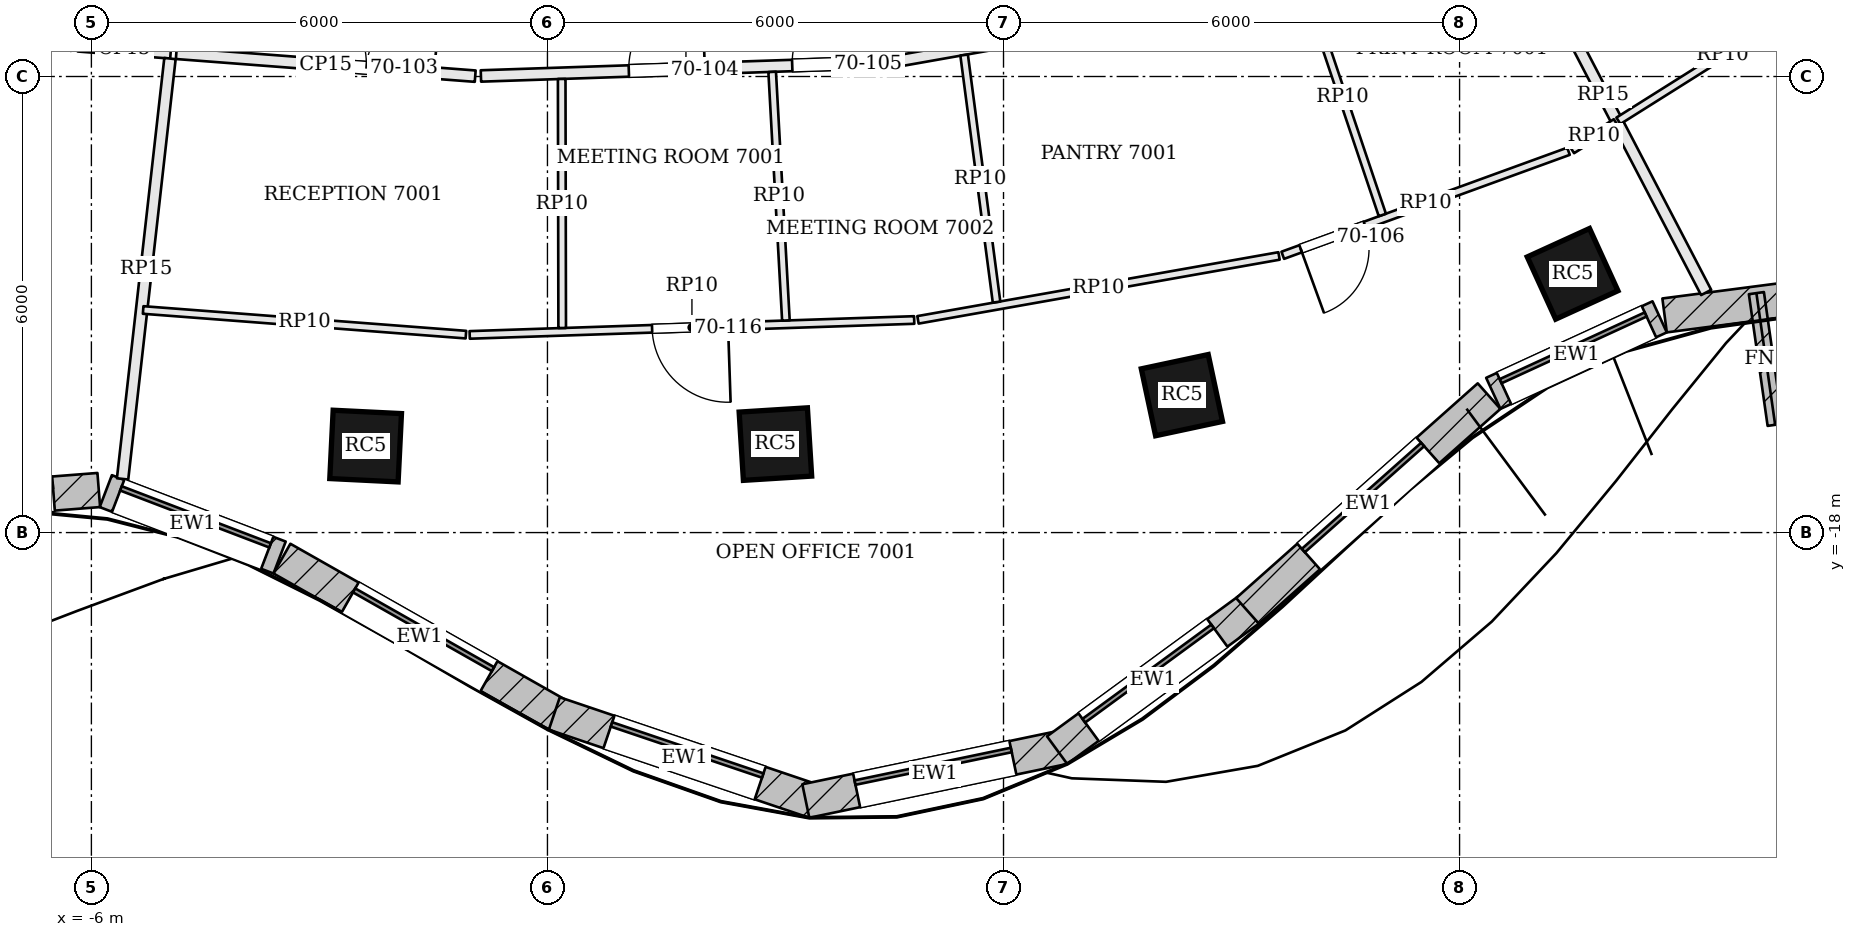
"""IFC4 building model, lengths in metres.
Left out: names, types, materials, properties, quantities, classifications, styles, units other than length and angle.
Written with IfcOpenShell. Run it as: python <this file> out.ifc"""

import sys

from ifc_helpers import new_model, si_unit, direction, frame, frame_2d, origin, origin_2d, place, context, subcontext, project, spatial, rectangle, extrude, element, fill, save


model = new_model("IFC4")
c1 = context("Model", 3, precision=1e-05, world=origin(), true_north=direction((0.0, 1.0)))
c2 = subcontext(c1, "Body", "Model", "MODEL_VIEW")
j1 = project(units=[si_unit("LENGTHUNIT", "METRE"), si_unit("PLANEANGLEUNIT", "RADIAN")], contexts=[c1])
p1 = place(None, origin())
s1 = spatial("IfcSite", under=j1, at=p1, CompositionType="ELEMENT")
p2 = place(p1, origin())
s2 = spatial("IfcBuilding", under=s1, at=p2, CompositionType="ELEMENT")
p3 = place(p2, frame((0.0, 0.0, 284.4)))
s3 = spatial("IfcBuildingStorey", under=s2, at=p3, CompositionType="ELEMENT", Elevation=284.4)
for number, where, z_axis, x_axis in (
    (1, (-2.392, -16.862, 0.0), (0.0, 0.0, 1.0), (0.999, -0.049, 0.0)),
    (2, (2.999, -16.836, 0.0), (0.0, 0.0, 1.0), (0.998, 0.062, 0.0)),
    (3, (8.347, -16.192, 0.0), (0.0, 0.0, 1.0), (0.978, 0.209, 0.0)),
    (4, (13.487, -14.596, 0.0), (0.0, 0.0, 1.0), (0.91, 0.415, 0.0)),
):
    element("IfcColumn", number, at=place(p3, frame(where, z_axis=z_axis, x_axis=x_axis)), inside=s3, PredefinedType="COLUMN", context=c2, shape_type="SweptSolid", body=[
        extrude(rectangle(XDim=0.9, YDim=0.9, at=origin_2d()), origin(), (0.0, 0.0, 1.0), 3.9),
    ])
p4 = place(p3, frame((-9.188, -17.697, 0.0), z_axis=(0.0, 0.0, 1.0), x_axis=(0.996964028691, 0.077863505548, 0.0)))
e5 = element("IfcWall", 5, at=p4, inside=s3, PredefinedType="SOLIDWALL", context=c2, shape_type="SweptSolid", body=[
    extrude(rectangle(XDim=3.295, YDim=0.45, at=frame_2d((1.648, 0.0))), origin(), (0.0, 0.0, 1.0), 3.7),
])
p5 = place(p4, frame((0.598, 0.0, 0.9)))
e6 = element("IfcOpeningElement", 6, at=p5, cuts=e5, PredefinedType="OPENING", context=c2, shape_type="SweptSolid", body=[
    extrude(rectangle(XDim=2.1, YDim=2.3, at=frame_2d((1.05, 1.15))), frame((0.0, 0.235, 0.0), z_axis=(0.0, -1.0, 0.0), x_axis=(1.0, 0.0, 0.0)), (0.0, 0.0, 1.0), 0.47),
])
p6 = place(p3, frame((-5.811, -17.455, 0.0), z_axis=(0.0, 0.0, 1.0), x_axis=(0.934122271306, -0.35695319336, 0.0)))
e7 = element("IfcWall", 7, at=p6, inside=s3, PredefinedType="SOLIDWALL", context=c2, shape_type="SweptSolid", body=[
    extrude(rectangle(XDim=2.448, YDim=0.45, at=frame_2d((1.224, 0.0))), origin(), (0.0, 0.0, 1.0), 3.7),
])
p7 = place(p6, frame((0.174, 0.0, 0.9)))
e8 = element("IfcOpeningElement", 8, at=p7, cuts=e7, PredefinedType="OPENING", context=c2, shape_type="SweptSolid", body=[
    extrude(rectangle(XDim=2.1, YDim=2.3, at=frame_2d((1.05, 1.15))), frame((0.0, 0.235, 0.0), z_axis=(0.0, -1.0, 0.0), x_axis=(1.0, 0.0, 0.0)), (0.0, 0.0, 1.0), 0.47),
])
p8 = place(p3, frame((-3.493, -18.343, 0.0), z_axis=(0.0, 0.0, 1.0), x_axis=(0.869825988853, -0.493358641473, 0.0)))
e9 = element("IfcWall", 9, at=p8, inside=s3, PredefinedType="SOLIDWALL", context=c2, shape_type="SweptSolid", body=[
    extrude(rectangle(XDim=4.165, YDim=0.45, at=frame_2d((2.083, 0.0))), origin(), (0.0, 0.0, 1.0), 3.7),
])
p9 = place(p8, frame((1.032, 0.0, 0.9)))
e10 = element("IfcOpeningElement", 10, at=p9, cuts=e9, PredefinedType="OPENING", context=c2, shape_type="SweptSolid", body=[
    extrude(rectangle(XDim=2.1, YDim=2.3, at=frame_2d((1.05, 1.15))), frame((0.0, 0.235, 0.0), z_axis=(0.0, -1.0, 0.0), x_axis=(1.0, 0.0, 0.0)), (0.0, 0.0, 1.0), 0.47),
])
p10 = place(p3, frame((0.091, -20.38, 0.0), z_axis=(0.0, 0.0, 1.0), x_axis=(0.947304227221, -0.320335294791, 0.0)))
e11 = element("IfcWall", 11, at=p10, inside=s3, PredefinedType="SOLIDWALL", context=c2, shape_type="SweptSolid", body=[
    extrude(rectangle(XDim=3.617, YDim=0.45, at=frame_2d((1.809, 0.0))), origin(), (0.0, 0.0, 1.0), 3.7),
])
p11 = place(p10, frame((0.759, 0.0, 0.9)))
e12 = element("IfcOpeningElement", 12, at=p11, cuts=e11, PredefinedType="OPENING", context=c2, shape_type="SweptSolid", body=[
    extrude(rectangle(XDim=2.1, YDim=2.3, at=frame_2d((1.05, 1.15))), frame((0.0, 0.235, 0.0), z_axis=(0.0, -1.0, 0.0), x_axis=(1.0, 0.0, 0.0)), (0.0, 0.0, 1.0), 0.47),
])
p12 = place(p3, frame((3.399, -21.532, 0.0), z_axis=(0.0, 0.0, 1.0), x_axis=(0.978915912181, 0.204263645512, 0.0)))
e13 = element("IfcWall", 13, at=p12, inside=s3, PredefinedType="SOLIDWALL", context=c2, shape_type="SweptSolid", body=[
    extrude(rectangle(XDim=3.466, YDim=0.45, at=frame_2d((1.733, 0.0))), origin(), (0.0, 0.0, 1.0), 3.7),
])
p13 = place(p12, frame((0.683, 0.0, 0.9)))
e14 = element("IfcOpeningElement", 14, at=p13, cuts=e13, PredefinedType="OPENING", context=c2, shape_type="SweptSolid", body=[
    extrude(rectangle(XDim=2.1, YDim=2.3, at=frame_2d((1.05, 1.15))), frame((0.0, 0.235, 0.0), z_axis=(0.0, -1.0, 0.0), x_axis=(1.0, 0.0, 0.0)), (0.0, 0.0, 1.0), 0.47),
])
p14 = place(p3, frame((6.705, -20.862, 0.0), z_axis=(0.0, 0.0, 1.0), x_axis=(0.806921336267, 0.590658917716, 0.0)))
e15 = element("IfcWall", 15, at=p14, inside=s3, PredefinedType="SOLIDWALL", context=c2, shape_type="SweptSolid", body=[
    extrude(rectangle(XDim=3.125, YDim=0.45, at=frame_2d((1.562, 0.0))), origin(), (0.0, 0.0, 1.0), 3.7),
])
p15 = place(p14, frame((0.512, 0.0, 0.9)))
e16 = element("IfcOpeningElement", 16, at=p15, cuts=e15, PredefinedType="OPENING", context=c2, shape_type="SweptSolid", body=[
    extrude(rectangle(XDim=2.1, YDim=2.3, at=frame_2d((1.05, 1.15))), frame((0.0, 0.235, 0.0), z_axis=(0.0, -1.0, 0.0), x_axis=(1.0, 0.0, 0.0)), (0.0, 0.0, 1.0), 0.47),
])
p16 = place(p3, frame((9.21, -19.03, 0.0), z_axis=(0.0, 0.0, 1.0), x_axis=(0.747396648191, 0.664378092861, 0.0)))
e17 = element("IfcWall", 17, at=p16, inside=s3, PredefinedType="SOLIDWALL", context=c2, shape_type="SweptSolid", body=[
    extrude(rectangle(XDim=4.252, YDim=0.45, at=frame_2d((2.126, 0.0))), origin(), (0.0, 0.0, 1.0), 3.7),
])
p17 = place(p16, frame((1.076, 0.0, 0.9)))
e18 = element("IfcOpeningElement", 18, at=p17, cuts=e17, PredefinedType="OPENING", context=c2, shape_type="SweptSolid", body=[
    extrude(rectangle(XDim=2.1, YDim=2.3, at=frame_2d((1.05, 1.15))), frame((0.0, 0.235, 0.0), z_axis=(0.0, -1.0, 0.0), x_axis=(1.0, 0.0, 0.0)), (0.0, 0.0, 1.0), 0.47),
])
p18 = place(p3, frame((12.444, -16.169, 0.0), z_axis=(0.0, 0.0, 1.0), x_axis=(0.908468904074, 0.417952449844, 0.0)))
e19 = element("IfcWall", 19, at=p18, inside=s3, PredefinedType="SOLIDWALL", context=c2, shape_type="SweptSolid", body=[
    extrude(rectangle(XDim=2.409, YDim=0.45, at=frame_2d((1.205, 0.0))), origin(), (0.0, 0.0, 1.0), 3.7),
])
p19 = place(p18, frame((0.155, 0.0, 0.9)))
e20 = element("IfcOpeningElement", 20, at=p19, cuts=e19, PredefinedType="OPENING", context=c2, shape_type="SweptSolid", body=[
    extrude(rectangle(XDim=2.1, YDim=2.3, at=frame_2d((1.05, 1.15))), frame((0.0, 0.235, 0.0), z_axis=(0.0, -1.0, 0.0), x_axis=(1.0, 0.0, 0.0)), (0.0, 0.0, 1.0), 0.47),
])
p20 = place(p3, frame((14.697, -15.143, 0.0), z_axis=(0.0, 0.0, 1.0), x_axis=(0.991631798411, 0.129098320597, 0.0)))
e21 = element("IfcWall", 21, at=p20, inside=s3, PredefinedType="SOLIDWALL", context=c2, shape_type="SweptSolid", body=[
    extrude(rectangle(XDim=5.547, YDim=0.45, at=frame_2d((2.773, 0.0))), origin(), (0.0, 0.0, 1.0), 3.7),
])
p21 = place(p20, frame((1.723, 0.0, 0.9)))
e22 = element("IfcOpeningElement", 22, at=p21, cuts=e21, PredefinedType="OPENING", context=c2, shape_type="SweptSolid", body=[
    extrude(rectangle(XDim=2.1, YDim=2.3, at=frame_2d((1.05, 1.15))), frame((0.0, 0.235, 0.0), z_axis=(0.0, -1.0, 0.0), x_axis=(1.0, 0.0, 0.0)), (0.0, 0.0, 1.0), 0.47),
])
p22 = place(p3, frame((15.905, -14.85, 0.0), z_axis=(0.0, 0.0, 1.0), x_axis=(0.140913490987, -0.990021912918, 0.0)))
e23 = element("IfcWall", 23, at=p22, inside=s3, PredefinedType="SOLIDWALL", context=c2, shape_type="SweptSolid", body=[
    extrude(rectangle(XDim=1.75, YDim=0.2, at=frame_2d((0.875, 0.0))), origin(), (0.0, 0.0, 1.0), 3.7),
])
p23 = place(p3, frame((-6.175, -11.596, 0.0), z_axis=(0.0, 0.0, 1.0), x_axis=(0.997106038867, -0.076023333621, 0.0)))
e24 = element("IfcWall", 24, at=p23, inside=s3, PredefinedType="PARTITIONING", context=c2, shape_type="SweptSolid", body=[
    extrude(rectangle(XDim=1.22, YDim=0.15, at=frame_2d((0.61, 0.0))), origin(), (0.0, 0.0, 1.0), 3.198),
])
p24 = place(p3, frame((-5.59, -17.294, 0.0), z_axis=(0.0, 0.0, 1.0), x_axis=(0.112044411854, 0.993703200041, 0.0)))
e25 = element("IfcWall", 25, at=p24, inside=s3, PredefinedType="PARTITIONING", context=c2, shape_type="SweptSolid", body=[
    extrude(rectangle(XDim=5.565, YDim=0.15, at=frame_2d((2.783, 0.0))), origin(), (0.0, 0.0, 1.0), 3.234),
])
p25 = place(p3, frame((-4.883, -11.695, 0.0), z_axis=(0.0, 0.0, 1.0), x_axis=(0.997096936577, -0.076142623207, 0.0)))
e26 = element("IfcWall", 26, at=p25, inside=s3, PredefinedType="PARTITIONING", context=c2, shape_type="SweptSolid", body=[
    extrude(rectangle(XDim=3.944, YDim=0.15, at=frame_2d((1.972, 0.0))), origin(), (0.0, 0.0, 1.0), 3.198),
])
p26 = place(p25, frame((1.604, 0.0, 0.0)))
e27 = element("IfcOpeningElement", 27, at=p26, cuts=e26, PredefinedType="OPENING", context=c2, shape_type="SweptSolid", body=[
    extrude(rectangle(XDim=1.8, YDim=2.1, at=frame_2d((0.9, 1.05))), frame((0.0, 0.085, 0.0), z_axis=(0.0, -1.0, 0.0), x_axis=(1.0, 0.0, 0.0)), (0.0, 0.0, 1.0), 0.17),
])
p27 = place(p3, frame((-0.875, -11.993, 0.0), z_axis=(0.0, 0.0, 1.0), x_axis=(0.999436745295, 0.033558786542, 0.0)))
e28 = element("IfcWall", 28, at=p27, inside=s3, PredefinedType="PARTITIONING", context=c2, shape_type="SweptSolid", body=[
    extrude(rectangle(XDim=5.398, YDim=0.15, at=frame_2d((2.699, 0.0))), origin(), (0.0, 0.0, 1.0), 3.198),
])
p28 = place(p27, frame((1.947, 0.0, 0.0)))
e29 = element("IfcOpeningElement", 29, at=p28, cuts=e28, PredefinedType="OPENING", context=c2, shape_type="SweptSolid", body=[
    extrude(rectangle(XDim=1.0, YDim=2.4, at=frame_2d((0.5, 1.2))), frame((0.0, 0.085, 0.0), z_axis=(0.0, -1.0, 0.0), x_axis=(1.0, 0.0, 0.0)), (0.0, 0.0, 1.0), 0.17),
])
p29 = place(p27, frame((4.098, 0.0, 0.0)))
e30 = element("IfcOpeningElement", 30, at=p29, cuts=e28, PredefinedType="OPENING", context=c2, shape_type="SweptSolid", body=[
    extrude(rectangle(XDim=1.0, YDim=2.4, at=frame_2d((0.5, 1.2))), frame((0.0, 0.085, 0.0), z_axis=(0.0, -1.0, 0.0), x_axis=(1.0, 0.0, 0.0)), (0.0, 0.0, 1.0), 0.17),
])
p30 = place(p3, frame((4.594, -11.799, 0.0), z_axis=(0.0, 0.0, 1.0), x_axis=(0.984693444773, 0.174295208833, 0.0)))
e31 = element("IfcWall", 31, at=p30, inside=s3, PredefinedType="PARTITIONING", context=c2, shape_type="SweptSolid", body=[
    extrude(rectangle(XDim=4.261, YDim=0.15, at=frame_2d((2.13, 0.0))), origin(), (0.0, 0.0, 1.0), 3.198),
])
p31 = place(p30, frame((2.05, 0.0, 0.0)))
e32 = element("IfcOpeningElement", 32, at=p31, cuts=e31, PredefinedType="OPENING", context=c2, shape_type="SweptSolid", body=[
    extrude(rectangle(XDim=1.0, YDim=2.1, at=frame_2d((0.5, 1.05))), frame((0.0, 0.085, 0.0), z_axis=(0.0, -1.0, 0.0), x_axis=(1.0, 0.0, 0.0)), (0.0, 0.0, 1.0), 0.17),
])
p32 = place(p3, frame((15.244, -14.841, 0.0), z_axis=(0.0, 0.0, 1.0), x_axis=(-0.462122511499, 0.886816093881, 0.0)))
e33 = element("IfcWall", 33, at=p32, inside=s3, PredefinedType="PARTITIONING", context=c2, shape_type="SweptSolid", body=[
    extrude(rectangle(XDim=5.871, YDim=0.15, at=frame_2d((2.935, 0.0))), origin(), (0.0, 0.0, 1.0), 3.234),
])
p33 = place(p3, frame((14.056, -12.604, 0.0), z_axis=(0.0, 0.0, 1.0), x_axis=(-0.846544184051, -0.532318461496, 0.0)))
e34 = element("IfcWall", 34, at=p33, inside=s3, PredefinedType="PARTITIONING", context=c2, shape_type="SweptSolid", body=[
    extrude(rectangle(XDim=0.681, YDim=0.1, at=frame_2d((0.34, 0.0))), origin(), (0.0, 0.0, 1.0), 3.198),
])
p34 = place(p3, frame((13.433, -12.984, 0.0), z_axis=(0.0, 0.0, 1.0), x_axis=(-0.939673979614, -0.342071355182, 0.0)))
e35 = element("IfcWall", 35, at=p34, inside=s3, PredefinedType="PARTITIONING", context=c2, shape_type="SweptSolid", body=[
    extrude(rectangle(XDim=4.0, YDim=0.1, at=frame_2d((2.0, 0.0))), origin(), (0.0, 0.0, 1.0), 3.198),
])
p35 = place(p34, frame((2.85, 0.0, 0.0)))
e36 = element("IfcOpeningElement", 36, at=p35, cuts=e35, PredefinedType="OPENING", context=c2, shape_type="SweptSolid", body=[
    extrude(rectangle(XDim=0.9, YDim=2.1, at=frame_2d((0.45, 1.05))), frame((0.0, 0.06, 0.0), z_axis=(0.0, -1.0, 0.0), x_axis=(1.0, 0.0, 0.0)), (0.0, 0.0, 1.0), 0.12),
])
p36 = place(p3, frame((9.625, -14.361, 0.0), z_axis=(0.0, 0.0, 1.0), x_axis=(-0.984691710098, -0.174305008716, 0.0)))
e37 = element("IfcWall", 37, at=p36, inside=s3, PredefinedType="PARTITIONING", context=c2, shape_type="SweptSolid", body=[
    extrude(rectangle(XDim=4.824, YDim=0.1, at=frame_2d((2.412, 0.0))), origin(), (0.0, 0.0, 1.0), 3.198),
])
p37 = place(p3, frame((4.825, -15.203, 0.0), z_axis=(0.0, 0.0, 1.0), x_axis=(-0.999435699456, -0.033589918924, 0.0)))
e38 = element("IfcWall", 38, at=p37, inside=s3, PredefinedType="PARTITIONING", context=c2, shape_type="SweptSolid", body=[
    extrude(rectangle(XDim=5.851, YDim=0.1, at=frame_2d((2.926, 0.0))), origin(), (0.0, 0.0, 1.0), 3.198),
])
p38 = place(p37, frame((2.45, 0.0, 0.0)))
e39 = element("IfcOpeningElement", 39, at=p38, cuts=e38, PredefinedType="OPENING", context=c2, shape_type="SweptSolid", body=[
    extrude(rectangle(XDim=1.0, YDim=2.4, at=frame_2d((0.5, 1.2))), frame((0.0, 0.06, 0.0), z_axis=(0.0, -1.0, 0.0), x_axis=(1.0, 0.0, 0.0)), (0.0, 0.0, 1.0), 0.12),
])
p39 = place(p3, frame((-1.073, -15.396, 0.0), z_axis=(0.0, 0.0, 1.0), x_axis=(-0.997093140471, 0.076192317369, 0.0)))
e40 = element("IfcWall", 40, at=p39, inside=s3, PredefinedType="PARTITIONING", context=c2, shape_type="SweptSolid", body=[
    extrude(rectangle(XDim=4.259, YDim=0.1, at=frame_2d((2.129, 0.0))), origin(), (0.0, 0.0, 1.0), 3.198),
])
p40 = place(p3, frame((0.188, -12.032, 0.0), z_axis=(0.0, 0.0, 1.0), x_axis=(0.001937258864, -0.999998123512, 0.0)))
e41 = element("IfcWall", 41, at=p40, inside=s3, PredefinedType="PARTITIONING", context=c2, shape_type="SweptSolid", body=[
    extrude(rectangle(XDim=3.277, YDim=0.1, at=frame_2d((1.638, 0.0))), origin(), (0.0, 0.0, 1.0), 3.198),
])
p41 = place(p3, frame((2.956, -11.939, 0.0), z_axis=(0.0, 0.0, 1.0), x_axis=(0.055226477976, -0.998473853504, 0.0)))
e42 = element("IfcWall", 42, at=p41, inside=s3, PredefinedType="PARTITIONING", context=c2, shape_type="SweptSolid", body=[
    extrude(rectangle(XDim=3.276, YDim=0.1, at=frame_2d((1.638, 0.0))), origin(), (0.0, 0.0, 1.0), 3.198),
])
p42 = place(p3, frame((5.482, -11.718, 0.0), z_axis=(0.0, 0.0, 1.0), x_axis=(0.130173255727, -0.991491262439, 0.0)))
e43 = element("IfcWall", 43, at=p42, inside=s3, PredefinedType="PARTITIONING", context=c2, shape_type="SweptSolid", body=[
    extrude(rectangle(XDim=3.278, YDim=0.1, at=frame_2d((1.639, 0.0))), origin(), (0.0, 0.0, 1.0), 3.198),
])
p43 = place(p3, frame((9.94, -10.717, 0.0), z_axis=(0.0, 0.0, 1.0), x_axis=(0.318730603816, -0.947845347191, 0.0)))
e44 = element("IfcWall", 44, at=p43, inside=s3, PredefinedType="PARTITIONING", context=c2, shape_type="SweptSolid", body=[
    extrude(rectangle(XDim=3.276, YDim=0.1, at=frame_2d((1.638, 0.0))), origin(), (0.0, 0.0, 1.0), 3.198),
])
p44 = place(p3, frame((16.831, -10.858, 0.0), z_axis=(0.0, 0.0, 1.0), x_axis=(-0.846427876971, -0.532503379413, 0.0)))
e45 = element("IfcWall", 45, at=p44, inside=s3, PredefinedType="PARTITIONING", context=c2, shape_type="SweptSolid", body=[
    extrude(rectangle(XDim=3.239, YDim=0.1, at=frame_2d((1.62, 0.0))), origin(), (0.0, 0.0, 1.0), 3.198),
])
p45 = place(p5, origin())
e46 = element("IfcWindow", 46, at=p45, inside=s3, PartitioningType="SINGLE_PANEL", PredefinedType="WINDOW", context=c2, shape_type="SweptSolid", body=[
    extrude(rectangle(XDim=2.1, YDim=2.3, at=frame_2d((1.05, 1.15))), frame((0.0, 0.135, 0.0), z_axis=(0.0, -1.0, 0.0), x_axis=(1.0, 0.0, 0.0)), (0.0, 0.0, 1.0), 0.06),
])
fill(e6, e46)
p46 = place(p7, origin())
e47 = element("IfcWindow", 47, at=p46, inside=s3, PartitioningType="SINGLE_PANEL", PredefinedType="WINDOW", context=c2, shape_type="SweptSolid", body=[
    extrude(rectangle(XDim=2.1, YDim=2.3, at=frame_2d((1.05, 1.15))), frame((0.0, 0.135, 0.0), z_axis=(0.0, -1.0, 0.0), x_axis=(1.0, 0.0, 0.0)), (0.0, 0.0, 1.0), 0.06),
])
fill(e8, e47)
p47 = place(p9, origin())
e48 = element("IfcWindow", 48, at=p47, inside=s3, PartitioningType="SINGLE_PANEL", PredefinedType="WINDOW", context=c2, shape_type="SweptSolid", body=[
    extrude(rectangle(XDim=2.1, YDim=2.3, at=frame_2d((1.05, 1.15))), frame((0.0, 0.135, 0.0), z_axis=(0.0, -1.0, 0.0), x_axis=(1.0, 0.0, 0.0)), (0.0, 0.0, 1.0), 0.06),
])
fill(e10, e48)
p48 = place(p11, origin())
e49 = element("IfcWindow", 49, at=p48, inside=s3, PartitioningType="SINGLE_PANEL", PredefinedType="WINDOW", context=c2, shape_type="SweptSolid", body=[
    extrude(rectangle(XDim=2.1, YDim=2.3, at=frame_2d((1.05, 1.15))), frame((0.0, 0.135, 0.0), z_axis=(0.0, -1.0, 0.0), x_axis=(1.0, 0.0, 0.0)), (0.0, 0.0, 1.0), 0.06),
])
fill(e12, e49)
p49 = place(p13, origin())
e50 = element("IfcWindow", 50, at=p49, inside=s3, PartitioningType="SINGLE_PANEL", PredefinedType="WINDOW", context=c2, shape_type="SweptSolid", body=[
    extrude(rectangle(XDim=2.1, YDim=2.3, at=frame_2d((1.05, 1.15))), frame((0.0, 0.135, 0.0), z_axis=(0.0, -1.0, 0.0), x_axis=(1.0, 0.0, 0.0)), (0.0, 0.0, 1.0), 0.06),
])
fill(e14, e50)
p50 = place(p15, origin())
e51 = element("IfcWindow", 51, at=p50, inside=s3, PartitioningType="SINGLE_PANEL", PredefinedType="WINDOW", context=c2, shape_type="SweptSolid", body=[
    extrude(rectangle(XDim=2.1, YDim=2.3, at=frame_2d((1.05, 1.15))), frame((0.0, 0.135, 0.0), z_axis=(0.0, -1.0, 0.0), x_axis=(1.0, 0.0, 0.0)), (0.0, 0.0, 1.0), 0.06),
])
fill(e16, e51)
p51 = place(p17, origin())
e52 = element("IfcWindow", 52, at=p51, inside=s3, PartitioningType="SINGLE_PANEL", PredefinedType="WINDOW", context=c2, shape_type="SweptSolid", body=[
    extrude(rectangle(XDim=2.1, YDim=2.3, at=frame_2d((1.05, 1.15))), frame((0.0, 0.135, 0.0), z_axis=(0.0, -1.0, 0.0), x_axis=(1.0, 0.0, 0.0)), (0.0, 0.0, 1.0), 0.06),
])
fill(e18, e52)
p52 = place(p19, origin())
e53 = element("IfcWindow", 53, at=p52, inside=s3, PartitioningType="SINGLE_PANEL", PredefinedType="WINDOW", context=c2, shape_type="SweptSolid", body=[
    extrude(rectangle(XDim=2.1, YDim=2.3, at=frame_2d((1.05, 1.15))), frame((0.0, 0.135, 0.0), z_axis=(0.0, -1.0, 0.0), x_axis=(1.0, 0.0, 0.0)), (0.0, 0.0, 1.0), 0.06),
])
fill(e20, e53)
p53 = place(p26, origin())
e54 = element("IfcDoor", 54, at=p53, inside=s3, OperationType="DOUBLE_DOOR_SINGLE_SWING", PredefinedType="DOOR", context=c2, shape_type="SweptSolid", body=[
    extrude(rectangle(XDim=1.8, YDim=2.1, at=frame_2d((0.9, 1.05))), frame((0.0, 0.025, 0.0), z_axis=(0.0, -1.0, 0.0), x_axis=(1.0, 0.0, 0.0)), (0.0, 0.0, 1.0), 0.05),
])
fill(e27, e54)
p54 = place(p28, origin())
e55 = element("IfcDoor", 55, at=p54, inside=s3, OperationType="SINGLE_SWING_RIGHT", PredefinedType="DOOR", context=c2, shape_type="SweptSolid", body=[
    extrude(rectangle(XDim=1.0, YDim=2.4, at=frame_2d((0.5, 1.2))), frame((0.0, 0.025, 0.0), z_axis=(0.0, -1.0, 0.0), x_axis=(1.0, 0.0, 0.0)), (0.0, 0.0, 1.0), 0.05),
])
fill(e29, e55)
p55 = place(p29, origin())
e56 = element("IfcDoor", 56, at=p55, inside=s3, OperationType="SINGLE_SWING_RIGHT", PredefinedType="DOOR", context=c2, shape_type="SweptSolid", body=[
    extrude(rectangle(XDim=1.0, YDim=2.4, at=frame_2d((0.5, 1.2))), frame((0.0, 0.025, 0.0), z_axis=(0.0, -1.0, 0.0), x_axis=(1.0, 0.0, 0.0)), (0.0, 0.0, 1.0), 0.05),
])
fill(e30, e56)
p56 = place(p35, origin())
e57 = element("IfcDoor", 57, at=p56, inside=s3, OperationType="SINGLE_SWING_RIGHT", PredefinedType="DOOR", context=c2, shape_type="SweptSolid", body=[
    extrude(rectangle(XDim=0.9, YDim=2.1, at=frame_2d((0.45, 1.05))), frame((0.0, 0.025, 0.0), z_axis=(0.0, -1.0, 0.0), x_axis=(1.0, 0.0, 0.0)), (0.0, 0.0, 1.0), 0.05),
])
fill(e36, e57)
p57 = place(p38, origin())
e58 = element("IfcDoor", 58, at=p57, inside=s3, OperationType="SINGLE_SWING_LEFT", PredefinedType="DOOR", context=c2, shape_type="SweptSolid", body=[
    extrude(rectangle(XDim=1.0, YDim=2.4, at=frame_2d((0.5, 1.2))), frame((0.0, 0.025, 0.0), z_axis=(0.0, -1.0, 0.0), x_axis=(1.0, 0.0, 0.0)), (0.0, 0.0, 1.0), 0.05),
])
fill(e39, e58)
save(model, sys.argv[1])
